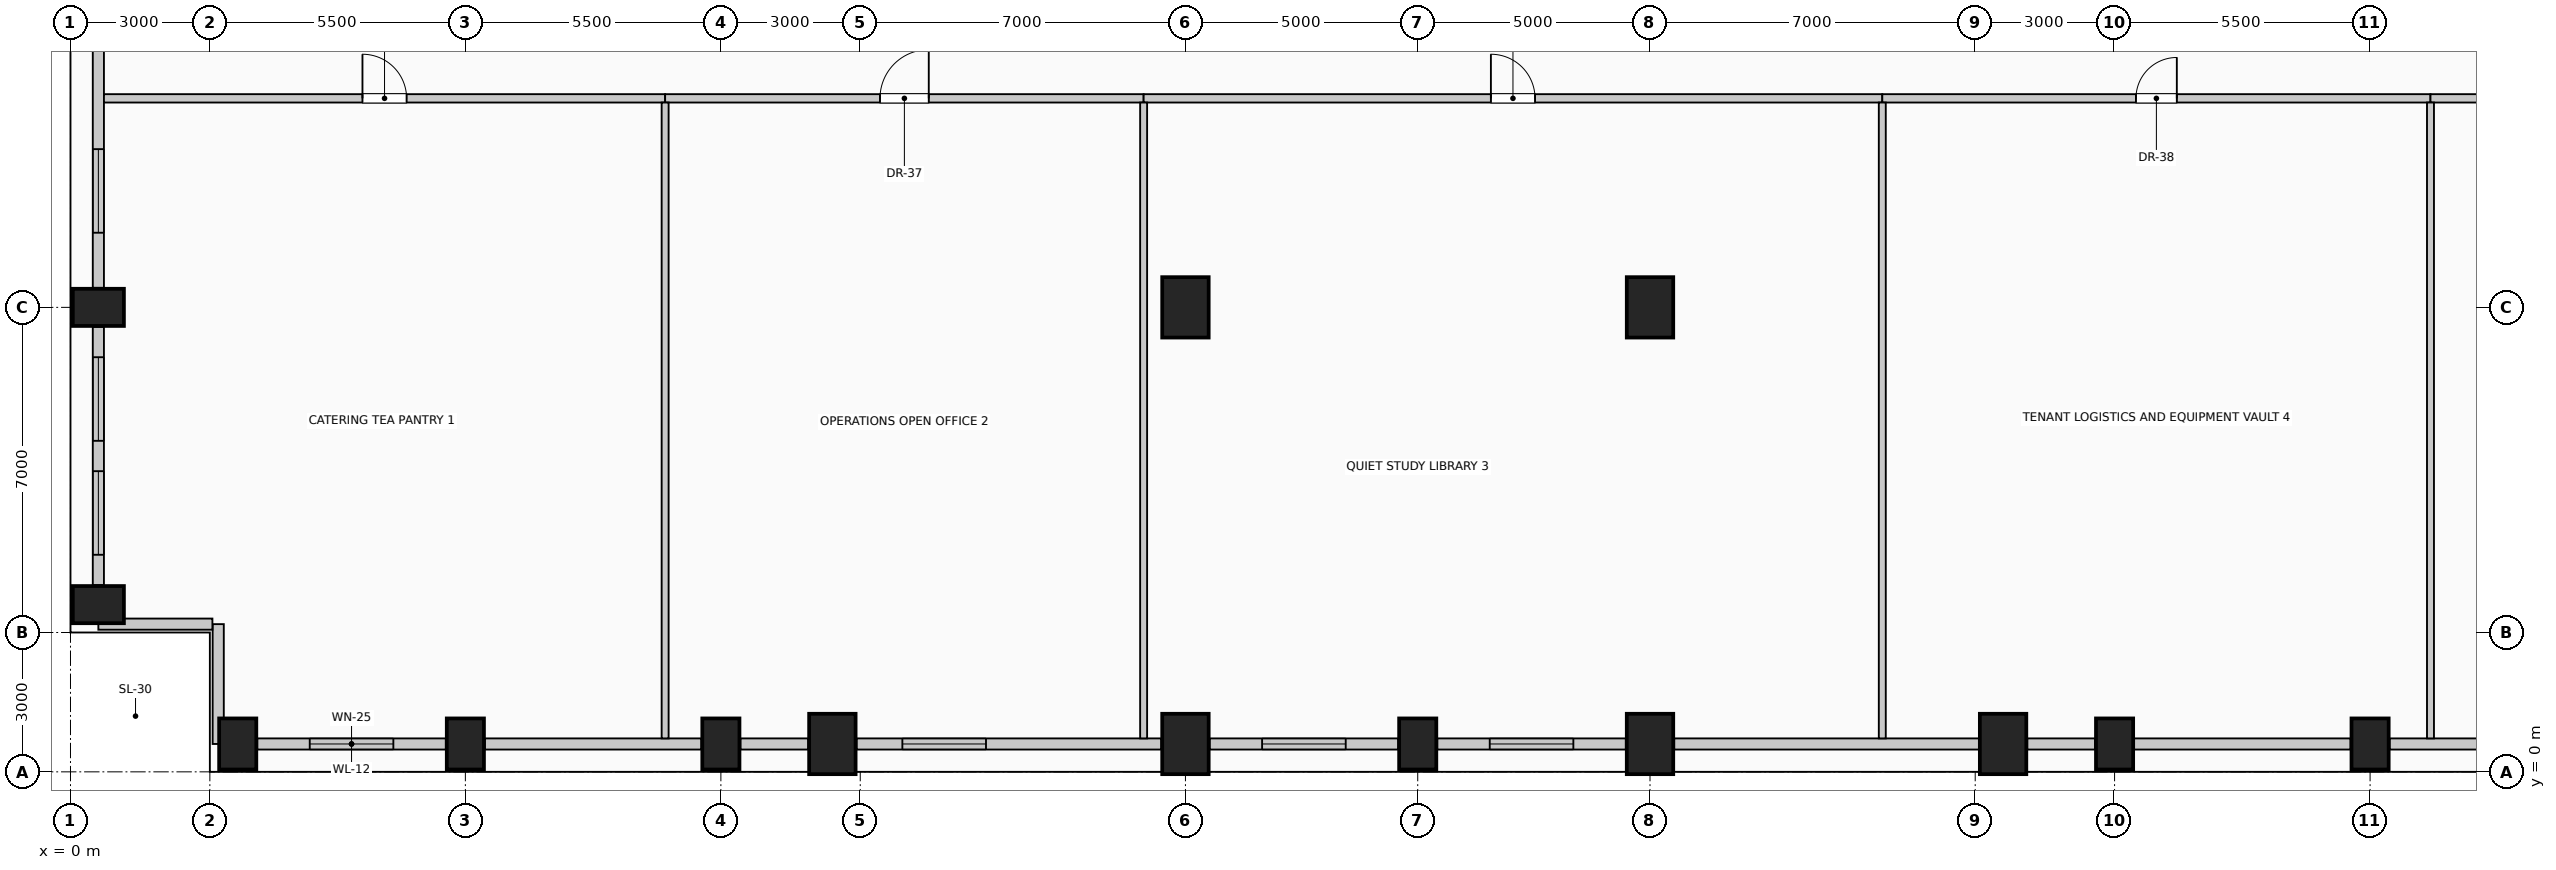
"""IFC4 building model, lengths in metres.
Left out: names, types, materials, properties, quantities, classifications, styles, units other than length and angle.
Written with IfcOpenShell. Run it as: python <this file> out.ifc"""

import sys

from ifc_helpers import new_model, si_unit, direction, frame, frame_2d, origin, origin_2d, place, context, subcontext, project, spatial, rectangle, extrude, element, fill, save


model = new_model("IFC4")
c1 = context("Model", 3, precision=1e-05, world=origin(), true_north=direction((0.0, 1.0)))
c2 = subcontext(c1, "Body", "Model", "MODEL_VIEW")
j1 = project(units=[si_unit("LENGTHUNIT", "METRE"), si_unit("PLANEANGLEUNIT", "RADIAN")], contexts=[c1])
p1 = place(None, origin())
s1 = spatial("IfcSite", under=j1, at=p1, CompositionType="ELEMENT")
p2 = place(p1, origin())
s2 = spatial("IfcBuilding", under=s1, at=p2, CompositionType="ELEMENT")
p3 = place(p2, frame((0.0, 0.0, 214.6)))
s3 = spatial("IfcBuildingStorey", under=s2, at=p3, CompositionType="ELEMENT", Elevation=214.6)
for number, where, z_axis, x_axis in (
    (1, (3.6, 0.6, 0.0), (0.0, 0.0, 1.0), (1.0, 0.0, 0.0)),
    (2, (8.5, 0.6, 0.0), (0.0, 0.0, 1.0), (1.0, 0.0, 0.0)),
    (3, (14.0, 0.6, 0.0), (0.0, 0.0, 1.0), (1.0, 0.0, 0.0)),
):
    element("IfcColumn", number, at=place(p3, frame(where, z_axis=z_axis, x_axis=x_axis)), inside=s3, PredefinedType="COLUMN", context=c2, shape_type="SweptSolid", body=[
        extrude(rectangle(XDim=0.8, YDim=1.1, at=origin_2d()), origin(), (0.0, 0.0, 1.0), 4.0),
    ])
for number, where, z_axis, x_axis in (
    (4, (16.4, 0.6, 0.0), (0.0, 0.0, 1.0), (1.0, 0.0, 0.0)),
    (5, (24.0, 0.6, 0.0), (0.0, 0.0, 1.0), (1.0, 0.0, 0.0)),
):
    element("IfcColumn", number, at=place(p3, frame(where, z_axis=z_axis, x_axis=x_axis)), inside=s3, PredefinedType="COLUMN", context=c2, shape_type="SweptSolid", body=[
        extrude(rectangle(XDim=1.0, YDim=1.3, at=origin_2d()), origin(), (0.0, 0.0, 1.0), 4.0),
    ])
p4 = place(p3, frame((29.0, 0.6, 0.0), z_axis=(0.0, 0.0, 1.0), x_axis=(1.0, 0.0, 0.0)))
e6 = element("IfcColumn", 6, at=p4, inside=s3, PredefinedType="COLUMN", context=c2, shape_type="SweptSolid", body=[
    extrude(rectangle(XDim=0.8, YDim=1.1, at=origin_2d()), origin(), (0.0, 0.0, 1.0), 4.0),
])
for number, where, z_axis, x_axis in (
    (7, (34.0, 0.6, 0.0), (0.0, 0.0, 1.0), (1.0, 0.0, 0.0)),
    (8, (41.6, 0.6, 0.0), (0.0, 0.0, 1.0), (1.0, 0.0, 0.0)),
):
    element("IfcColumn", number, at=place(p3, frame(where, z_axis=z_axis, x_axis=x_axis)), inside=s3, PredefinedType="COLUMN", context=c2, shape_type="SweptSolid", body=[
        extrude(rectangle(XDim=1.0, YDim=1.3, at=origin_2d()), origin(), (0.0, 0.0, 1.0), 4.0),
    ])
for number, where, z_axis, x_axis in (
    (9, (44.0, 0.6, 0.0), (0.0, 0.0, 1.0), (1.0, 0.0, 0.0)),
    (10, (49.5, 0.6, 0.0), (0.0, 0.0, 1.0), (1.0, 0.0, 0.0)),
    (11, (0.6, 3.6, 0.0), (0.0, 0.0, 1.0), (0.0, 1.0, 0.0)),
    (12, (0.6, 10.0, 0.0), (0.0, 0.0, 1.0), (0.0, 1.0, 0.0)),
):
    element("IfcColumn", number, at=place(p3, frame(where, z_axis=z_axis, x_axis=x_axis)), inside=s3, PredefinedType="COLUMN", context=c2, shape_type="SweptSolid", body=[
        extrude(rectangle(XDim=0.8, YDim=1.1, at=origin_2d()), origin(), (0.0, 0.0, 1.0), 4.0),
    ])
for number, where, z_axis, x_axis in (
    (13, (24.0, 10.0, 0.0), (0.0, 0.0, 1.0), (1.0, 0.0, 0.0)),
    (14, (34.0, 10.0, 0.0), (0.0, 0.0, 1.0), (1.0, 0.0, 0.0)),
):
    element("IfcColumn", number, at=place(p3, frame(where, z_axis=z_axis, x_axis=x_axis)), inside=s3, PredefinedType="COLUMN", context=c2, shape_type="SweptSolid", body=[
        extrude(rectangle(XDim=1.0, YDim=1.3, at=origin_2d()), origin(), (0.0, 0.0, 1.0), 4.0),
    ])
p5 = place(p3, frame((8.08, 0.6, 0.0), z_axis=(0.0, 0.0, 1.0), x_axis=(-1.0, 0.0, 0.0)))
e15 = element("IfcWall", 15, at=p5, inside=s3, PredefinedType="SOLIDWALL", context=c2, shape_type="SweptSolid", body=[
    extrude(rectangle(XDim=4.06, YDim=0.24, at=frame_2d((2.03, 0.0))), origin(), (0.0, 0.0, 1.0), 3.0),
])
p6 = place(p5, frame((1.13, 0.0, 0.42)))
e16 = element("IfcOpeningElement", 16, at=p6, cuts=e15, PredefinedType="OPENING", context=c2, shape_type="SweptSolid", body=[
    extrude(rectangle(XDim=1.8, YDim=2.2, at=frame_2d((0.9, 1.1))), frame((0.0, 0.13, 0.0), z_axis=(0.0, -1.0, 0.0), x_axis=(1.0, 0.0, 0.0)), (0.0, 0.0, 1.0), 0.26),
])
p7 = place(p3, frame((13.58, 0.6, 0.0), z_axis=(0.0, 0.0, 1.0), x_axis=(-1.0, 0.0, 0.0)))
e17 = element("IfcWall", 17, at=p7, inside=s3, PredefinedType="SOLIDWALL", context=c2, shape_type="SweptSolid", body=[
    extrude(rectangle(XDim=4.66, YDim=0.24, at=frame_2d((2.33, 0.0))), origin(), (0.0, 0.0, 1.0), 3.0),
])
p8 = place(p3, frame((15.88, 0.6, 0.0), z_axis=(0.0, 0.0, 1.0), x_axis=(-1.0, 0.0, 0.0)))
e18 = element("IfcWall", 18, at=p8, inside=s3, PredefinedType="SOLIDWALL", context=c2, shape_type="SweptSolid", body=[
    extrude(rectangle(XDim=1.46, YDim=0.24, at=frame_2d((0.73, 0.0))), origin(), (0.0, 0.0, 1.0), 3.0),
])
p9 = place(p3, frame((23.48, 0.6, 0.0), z_axis=(0.0, 0.0, 1.0), x_axis=(-1.0, 0.0, 0.0)))
e19 = element("IfcWall", 19, at=p9, inside=s3, PredefinedType="SOLIDWALL", context=c2, shape_type="SweptSolid", body=[
    extrude(rectangle(XDim=6.56, YDim=0.24, at=frame_2d((3.28, 0.0))), origin(), (0.0, 0.0, 1.0), 3.0),
])
p10 = place(p9, frame((3.773, 0.0, 0.42)))
e20 = element("IfcOpeningElement", 20, at=p10, cuts=e19, PredefinedType="OPENING", context=c2, shape_type="SweptSolid", body=[
    extrude(rectangle(XDim=1.8, YDim=2.2, at=frame_2d((0.9, 1.1))), frame((0.0, 0.13, 0.0), z_axis=(0.0, -1.0, 0.0), x_axis=(1.0, 0.0, 0.0)), (0.0, 0.0, 1.0), 0.26),
])
p11 = place(p3, frame((28.58, 0.6, 0.0), z_axis=(0.0, 0.0, 1.0), x_axis=(-1.0, 0.0, 0.0)))
e21 = element("IfcWall", 21, at=p11, inside=s3, PredefinedType="SOLIDWALL", context=c2, shape_type="SweptSolid", body=[
    extrude(rectangle(XDim=4.06, YDim=0.24, at=frame_2d((2.03, 0.0))), origin(), (0.0, 0.0, 1.0), 3.0),
])
p12 = place(p11, frame((1.13, 0.0, 0.42)))
e22 = element("IfcOpeningElement", 22, at=p12, cuts=e21, PredefinedType="OPENING", context=c2, shape_type="SweptSolid", body=[
    extrude(rectangle(XDim=1.8, YDim=2.2, at=frame_2d((0.9, 1.1))), frame((0.0, 0.13, 0.0), z_axis=(0.0, -1.0, 0.0), x_axis=(1.0, 0.0, 0.0)), (0.0, 0.0, 1.0), 0.26),
])
p13 = place(p3, frame((33.48, 0.6, 0.0), z_axis=(0.0, 0.0, 1.0), x_axis=(-1.0, 0.0, 0.0)))
e23 = element("IfcWall", 23, at=p13, inside=s3, PredefinedType="SOLIDWALL", context=c2, shape_type="SweptSolid", body=[
    extrude(rectangle(XDim=4.06, YDim=0.24, at=frame_2d((2.03, 0.0))), origin(), (0.0, 0.0, 1.0), 3.0),
])
p14 = place(p13, frame((1.13, 0.0, 0.42)))
e24 = element("IfcOpeningElement", 24, at=p14, cuts=e23, PredefinedType="OPENING", context=c2, shape_type="SweptSolid", body=[
    extrude(rectangle(XDim=1.8, YDim=2.2, at=frame_2d((0.9, 1.1))), frame((0.0, 0.13, 0.0), z_axis=(0.0, -1.0, 0.0), x_axis=(1.0, 0.0, 0.0)), (0.0, 0.0, 1.0), 0.26),
])
p15 = place(p3, frame((41.08, 0.6, 0.0), z_axis=(0.0, 0.0, 1.0), x_axis=(-1.0, 0.0, 0.0)))
e25 = element("IfcWall", 25, at=p15, inside=s3, PredefinedType="SOLIDWALL", context=c2, shape_type="SweptSolid", body=[
    extrude(rectangle(XDim=6.56, YDim=0.24, at=frame_2d((3.28, 0.0))), origin(), (0.0, 0.0, 1.0), 3.0),
])
p16 = place(p3, frame((43.58, 0.6, 0.0), z_axis=(0.0, 0.0, 1.0), x_axis=(-1.0, 0.0, 0.0)))
e26 = element("IfcWall", 26, at=p16, inside=s3, PredefinedType="SOLIDWALL", context=c2, shape_type="SweptSolid", body=[
    extrude(rectangle(XDim=1.46, YDim=0.24, at=frame_2d((0.73, 0.0))), origin(), (0.0, 0.0, 1.0), 3.0),
])
p17 = place(p3, frame((49.08, 0.6, 0.0), z_axis=(0.0, 0.0, 1.0), x_axis=(-1.0, 0.0, 0.0)))
e27 = element("IfcWall", 27, at=p17, inside=s3, PredefinedType="SOLIDWALL", context=c2, shape_type="SweptSolid", body=[
    extrude(rectangle(XDim=4.66, YDim=0.24, at=frame_2d((2.33, 0.0))), origin(), (0.0, 0.0, 1.0), 3.0),
])
p18 = place(p3, frame((53.98, 0.6, 0.0), z_axis=(0.0, 0.0, 1.0), x_axis=(-1.0, 0.0, 0.0)))
e28 = element("IfcWall", 28, at=p18, inside=s3, PredefinedType="SOLIDWALL", context=c2, shape_type="SweptSolid", body=[
    extrude(rectangle(XDim=4.06, YDim=0.24, at=frame_2d((2.03, 0.0))), origin(), (0.0, 0.0, 1.0), 3.0),
])
p19 = place(p3, frame((0.6, 4.02, 0.0), z_axis=(0.0, 0.0, 1.0), x_axis=(0.0, 1.0, 0.0)))
e29 = element("IfcWall", 29, at=p19, inside=s3, PredefinedType="SOLIDWALL", context=c2, shape_type="SweptSolid", body=[
    extrude(rectangle(XDim=5.56, YDim=0.24, at=frame_2d((2.78, 0.0))), origin(), (0.0, 0.0, 1.0), 3.0),
])
p20 = place(p19, frame((0.653, 0.0, 0.42)))
e30 = element("IfcOpeningElement", 30, at=p20, cuts=e29, PredefinedType="OPENING", context=c2, shape_type="SweptSolid", body=[
    extrude(rectangle(XDim=1.8, YDim=2.2, at=frame_2d((0.9, 1.1))), frame((0.0, 0.13, 0.0), z_axis=(0.0, -1.0, 0.0), x_axis=(1.0, 0.0, 0.0)), (0.0, 0.0, 1.0), 0.26),
])
p21 = place(p19, frame((3.107, 0.0, 0.42)))
e31 = element("IfcOpeningElement", 31, at=p21, cuts=e29, PredefinedType="OPENING", context=c2, shape_type="SweptSolid", body=[
    extrude(rectangle(XDim=1.8, YDim=2.2, at=frame_2d((0.9, 1.1))), frame((0.0, 0.13, 0.0), z_axis=(0.0, -1.0, 0.0), x_axis=(1.0, 0.0, 0.0)), (0.0, 0.0, 1.0), 0.26),
])
p22 = place(p3, frame((0.6, 10.42, 0.0), z_axis=(0.0, 0.0, 1.0), x_axis=(0.0, 1.0, 0.0)))
e32 = element("IfcWall", 32, at=p22, inside=s3, PredefinedType="SOLIDWALL", context=c2, shape_type="SweptSolid", body=[
    extrude(rectangle(XDim=7.16, YDim=0.24, at=frame_2d((3.58, 0.0))), origin(), (0.0, 0.0, 1.0), 3.0),
])
p23 = place(p22, frame((1.187, 0.0, 0.42)))
e33 = element("IfcOpeningElement", 33, at=p23, cuts=e32, PredefinedType="OPENING", context=c2, shape_type="SweptSolid", body=[
    extrude(rectangle(XDim=1.8, YDim=2.2, at=frame_2d((0.9, 1.1))), frame((0.0, 0.13, 0.0), z_axis=(0.0, -1.0, 0.0), x_axis=(1.0, 0.0, 0.0)), (0.0, 0.0, 1.0), 0.26),
])
p24 = place(p3, frame((3.18, 0.6, 0.0), z_axis=(0.0, 0.0, 1.0), x_axis=(0.0, 1.0, 0.0)))
e34 = element("IfcWall", 34, at=p24, inside=s3, PredefinedType="SOLIDWALL", context=c2, shape_type="SweptSolid", body=[
    extrude(rectangle(XDim=2.58, YDim=0.24, at=frame_2d((1.29, 0.0))), origin(), (0.0, 0.0, 1.0), 3.75),
])
p25 = place(p3, frame((3.055, 3.18, 0.0), z_axis=(0.0, 0.0, 1.0), x_axis=(-1.0, 0.0, 0.0)))
e35 = element("IfcWall", 35, at=p25, inside=s3, PredefinedType="SOLIDWALL", context=c2, shape_type="SweptSolid", body=[
    extrude(rectangle(XDim=2.455, YDim=0.24, at=frame_2d((1.228, 0.0))), origin(), (0.0, 0.0, 1.0), 3.75),
])
p26 = place(p3, frame((0.72, 14.5, 0.0), z_axis=(0.0, 0.0, 1.0), x_axis=(1.0, 0.0, 0.0)))
e36 = element("IfcWall", 36, at=p26, inside=s3, PredefinedType="PARTITIONING", context=c2, shape_type="SweptSolid", body=[
    extrude(rectangle(XDim=12.08, YDim=0.18, at=frame_2d((6.04, 0.0))), origin(), (0.0, 0.0, 1.0), 3.75),
])
p27 = place(p26, frame((5.565, 0.0, 0.0)))
e37 = element("IfcOpeningElement", 37, at=p27, cuts=e36, PredefinedType="OPENING", context=c2, shape_type="SweptSolid", body=[
    extrude(rectangle(XDim=0.95, YDim=2.15, at=frame_2d((0.475, 1.075))), frame((0.0, 0.1, 0.0), z_axis=(0.0, -1.0, 0.0), x_axis=(1.0, 0.0, 0.0)), (0.0, 0.0, 1.0), 0.2),
])
p28 = place(p3, frame((12.8, 14.5, 0.0), z_axis=(0.0, 0.0, 1.0), x_axis=(1.0, 0.0, 0.0)))
e38 = element("IfcWall", 38, at=p28, inside=s3, PredefinedType="PARTITIONING", context=c2, shape_type="SweptSolid", body=[
    extrude(rectangle(XDim=10.3, YDim=0.18, at=frame_2d((5.15, 0.0))), origin(), (0.0, 0.0, 1.0), 3.75),
])
p29 = place(p28, frame((4.625, 0.0, 0.0)))
e39 = element("IfcOpeningElement", 39, at=p29, cuts=e38, PredefinedType="OPENING", context=c2, shape_type="SweptSolid", body=[
    extrude(rectangle(XDim=1.05, YDim=2.15, at=frame_2d((0.525, 1.075))), frame((0.0, 0.1, 0.0), z_axis=(0.0, -1.0, 0.0), x_axis=(1.0, 0.0, 0.0)), (0.0, 0.0, 1.0), 0.2),
])
p30 = place(p3, frame((23.1, 14.5, 0.0), z_axis=(0.0, 0.0, 1.0), x_axis=(1.0, 0.0, 0.0)))
e40 = element("IfcWall", 40, at=p30, inside=s3, PredefinedType="PARTITIONING", context=c2, shape_type="SweptSolid", body=[
    extrude(rectangle(XDim=15.9, YDim=0.18, at=frame_2d((7.95, 0.0))), origin(), (0.0, 0.0, 1.0), 3.75),
])
p31 = place(p30, frame((7.475, 0.0, 0.0)))
e41 = element("IfcOpeningElement", 41, at=p31, cuts=e40, PredefinedType="OPENING", context=c2, shape_type="SweptSolid", body=[
    extrude(rectangle(XDim=0.95, YDim=2.15, at=frame_2d((0.475, 1.075))), frame((0.0, 0.1, 0.0), z_axis=(0.0, -1.0, 0.0), x_axis=(1.0, 0.0, 0.0)), (0.0, 0.0, 1.0), 0.2),
])
p32 = place(p3, frame((39.0, 14.5, 0.0), z_axis=(0.0, 0.0, 1.0), x_axis=(1.0, 0.0, 0.0)))
e42 = element("IfcWall", 42, at=p32, inside=s3, PredefinedType="PARTITIONING", context=c2, shape_type="SweptSolid", body=[
    extrude(rectangle(XDim=11.8, YDim=0.18, at=frame_2d((5.9, 0.0))), origin(), (0.0, 0.0, 1.0), 3.75),
])
p33 = place(p32, frame((5.46, 0.0, 0.0)))
e43 = element("IfcOpeningElement", 43, at=p33, cuts=e42, PredefinedType="OPENING", context=c2, shape_type="SweptSolid", body=[
    extrude(rectangle(XDim=0.88, YDim=2.1, at=frame_2d((0.44, 1.05))), frame((0.0, 0.1, 0.0), z_axis=(0.0, -1.0, 0.0), x_axis=(1.0, 0.0, 0.0)), (0.0, 0.0, 1.0), 0.2),
])
p34 = place(p3, frame((50.8, 14.5, 0.0), z_axis=(0.0, 0.0, 1.0), x_axis=(1.0, 0.0, 0.0)))
e44 = element("IfcWall", 44, at=p34, inside=s3, PredefinedType="PARTITIONING", context=c2, shape_type="SweptSolid", body=[
    extrude(rectangle(XDim=6.48, YDim=0.18, at=frame_2d((3.24, 0.0))), origin(), (0.0, 0.0, 1.0), 3.75),
])
p35 = place(p34, frame((2.765, 0.0, 0.0)))
e45 = element("IfcOpeningElement", 45, at=p35, cuts=e44, PredefinedType="OPENING", context=c2, shape_type="SweptSolid", body=[
    extrude(rectangle(XDim=0.95, YDim=2.15, at=frame_2d((0.475, 1.075))), frame((0.0, 0.1, 0.0), z_axis=(0.0, -1.0, 0.0), x_axis=(1.0, 0.0, 0.0)), (0.0, 0.0, 1.0), 0.2),
])
for number, where, z_axis, x_axis in (
    (46, (12.8, 0.72, 0.0), (0.0, 0.0, 1.0), (0.0, 1.0, 0.0)),
    (47, (23.1, 0.72, 0.0), (0.0, 0.0, 1.0), (0.0, 1.0, 0.0)),
    (48, (39.0, 0.72, 0.0), (0.0, 0.0, 1.0), (0.0, 1.0, 0.0)),
    (49, (50.8, 0.72, 0.0), (0.0, 0.0, 1.0), (0.0, 1.0, 0.0)),
):
    element("IfcWall", number, at=place(p3, frame(where, z_axis=z_axis, x_axis=x_axis)), inside=s3, PredefinedType="PARTITIONING", context=c2, shape_type="SweptSolid", body=[
        extrude(rectangle(XDim=13.69, YDim=0.15, at=frame_2d((6.845, 0.0))), origin(), (0.0, 0.0, 1.0), 3.75),
    ])
p36 = place(p6, origin())
e50 = element("IfcWindow", 50, at=p36, inside=s3, PartitioningType="SINGLE_PANEL", PredefinedType="WINDOW", context=c2, shape_type="SweptSolid", body=[
    extrude(rectangle(XDim=1.8, YDim=2.2, at=frame_2d((0.9, 1.1))), frame((0.0, 0.03, 0.0), z_axis=(0.0, -1.0, 0.0), x_axis=(1.0, 0.0, 0.0)), (0.0, 0.0, 1.0), 0.06),
])
fill(e16, e50)
p37 = place(p10, origin())
e51 = element("IfcWindow", 51, at=p37, inside=s3, PartitioningType="SINGLE_PANEL", PredefinedType="WINDOW", context=c2, shape_type="SweptSolid", body=[
    extrude(rectangle(XDim=1.8, YDim=2.2, at=frame_2d((0.9, 1.1))), frame((0.0, 0.03, 0.0), z_axis=(0.0, -1.0, 0.0), x_axis=(1.0, 0.0, 0.0)), (0.0, 0.0, 1.0), 0.06),
])
fill(e20, e51)
p38 = place(p12, origin())
e52 = element("IfcWindow", 52, at=p38, inside=s3, PartitioningType="SINGLE_PANEL", PredefinedType="WINDOW", context=c2, shape_type="SweptSolid", body=[
    extrude(rectangle(XDim=1.8, YDim=2.2, at=frame_2d((0.9, 1.1))), frame((0.0, 0.03, 0.0), z_axis=(0.0, -1.0, 0.0), x_axis=(1.0, 0.0, 0.0)), (0.0, 0.0, 1.0), 0.06),
])
fill(e22, e52)
p39 = place(p14, origin())
e53 = element("IfcWindow", 53, at=p39, inside=s3, PartitioningType="SINGLE_PANEL", PredefinedType="WINDOW", context=c2, shape_type="SweptSolid", body=[
    extrude(rectangle(XDim=1.8, YDim=2.2, at=frame_2d((0.9, 1.1))), frame((0.0, 0.03, 0.0), z_axis=(0.0, -1.0, 0.0), x_axis=(1.0, 0.0, 0.0)), (0.0, 0.0, 1.0), 0.06),
])
fill(e24, e53)
p40 = place(p20, origin())
e54 = element("IfcWindow", 54, at=p40, inside=s3, PartitioningType="SINGLE_PANEL", PredefinedType="WINDOW", context=c2, shape_type="SweptSolid", body=[
    extrude(rectangle(XDim=1.8, YDim=2.2, at=frame_2d((0.9, 1.1))), frame((0.0, 0.03, 0.0), z_axis=(0.0, -1.0, 0.0), x_axis=(1.0, 0.0, 0.0)), (0.0, 0.0, 1.0), 0.06),
])
fill(e30, e54)
p41 = place(p21, origin())
e55 = element("IfcWindow", 55, at=p41, inside=s3, PartitioningType="SINGLE_PANEL", PredefinedType="WINDOW", context=c2, shape_type="SweptSolid", body=[
    extrude(rectangle(XDim=1.8, YDim=2.2, at=frame_2d((0.9, 1.1))), frame((0.0, 0.03, 0.0), z_axis=(0.0, -1.0, 0.0), x_axis=(1.0, 0.0, 0.0)), (0.0, 0.0, 1.0), 0.06),
])
fill(e31, e55)
p42 = place(p23, origin())
e56 = element("IfcWindow", 56, at=p42, inside=s3, PartitioningType="SINGLE_PANEL", PredefinedType="WINDOW", context=c2, shape_type="SweptSolid", body=[
    extrude(rectangle(XDim=1.8, YDim=2.2, at=frame_2d((0.9, 1.1))), frame((0.0, 0.03, 0.0), z_axis=(0.0, -1.0, 0.0), x_axis=(1.0, 0.0, 0.0)), (0.0, 0.0, 1.0), 0.06),
])
fill(e33, e56)
p43 = place(p27, origin())
e57 = element("IfcDoor", 57, at=p43, inside=s3, OperationType="SINGLE_SWING_LEFT", PredefinedType="DOOR", context=c2, shape_type="SweptSolid", body=[
    extrude(rectangle(XDim=0.95, YDim=2.15, at=frame_2d((0.475, 1.075))), frame((0.0, 0.025, 0.0), z_axis=(0.0, -1.0, 0.0), x_axis=(1.0, 0.0, 0.0)), (0.0, 0.0, 1.0), 0.05),
])
fill(e37, e57)
p44 = place(p29, origin())
e58 = element("IfcDoor", 58, at=p44, inside=s3, OperationType="SINGLE_SWING_RIGHT", PredefinedType="DOOR", context=c2, shape_type="SweptSolid", body=[
    extrude(rectangle(XDim=1.05, YDim=2.15, at=frame_2d((0.525, 1.075))), frame((0.0, 0.025, 0.0), z_axis=(0.0, -1.0, 0.0), x_axis=(1.0, 0.0, 0.0)), (0.0, 0.0, 1.0), 0.05),
])
fill(e39, e58)
p45 = place(p31, origin())
e59 = element("IfcDoor", 59, at=p45, inside=s3, OperationType="SINGLE_SWING_LEFT", PredefinedType="DOOR", context=c2, shape_type="SweptSolid", body=[
    extrude(rectangle(XDim=0.95, YDim=2.15, at=frame_2d((0.475, 1.075))), frame((0.0, 0.025, 0.0), z_axis=(0.0, -1.0, 0.0), x_axis=(1.0, 0.0, 0.0)), (0.0, 0.0, 1.0), 0.05),
])
fill(e41, e59)
p46 = place(p33, origin())
e60 = element("IfcDoor", 60, at=p46, inside=s3, OperationType="SINGLE_SWING_RIGHT", PredefinedType="DOOR", context=c2, shape_type="SweptSolid", body=[
    extrude(rectangle(XDim=0.88, YDim=2.1, at=frame_2d((0.44, 1.05))), frame((0.0, 0.025, 0.0), z_axis=(0.0, -1.0, 0.0), x_axis=(1.0, 0.0, 0.0)), (0.0, 0.0, 1.0), 0.05),
])
fill(e43, e60)
save(model, sys.argv[1])
